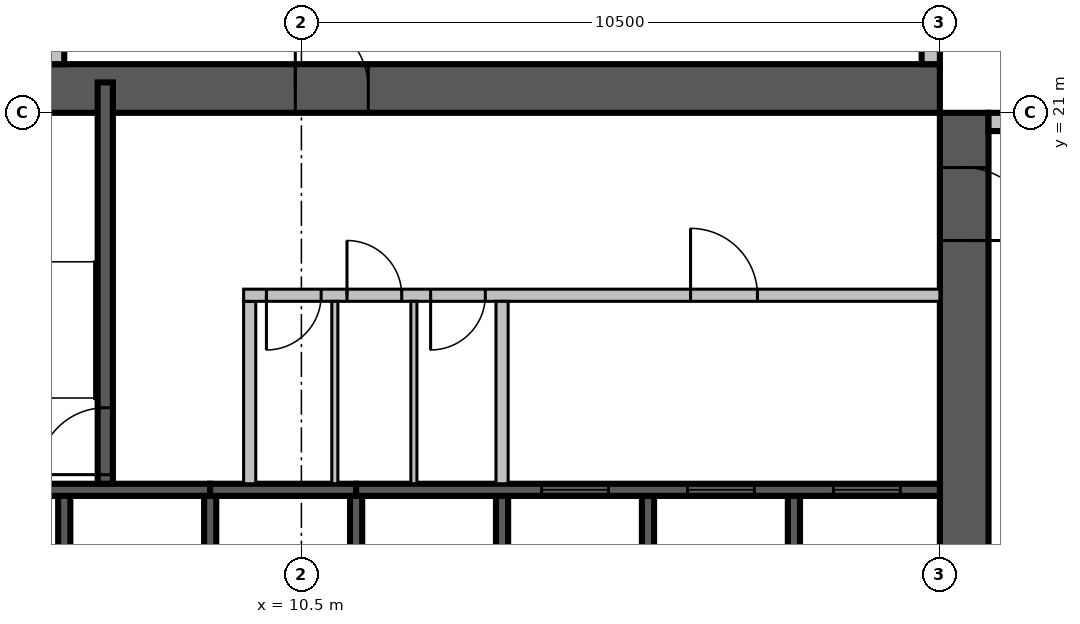
"""IFC4 building model, lengths in metres.
Left out: names, types, materials, properties, quantities, classifications, styles, units other than length and angle.
Written with IfcOpenShell. Run it as: python <this file> out.ifc"""

import sys

from ifc_helpers import new_model, si_unit, direction, frame, frame_2d, origin, place, context, subcontext, project, spatial, rectangle, extrude, source, transform, mapped, element, fill, save


model = new_model("IFC4")
c1 = context("Model", 3, precision=1e-05, world=origin(), true_north=direction((0.0, 1.0)))
c2 = subcontext(c1, "Body", "Model", "MODEL_VIEW")
j1 = project(units=[si_unit("LENGTHUNIT", "METRE"), si_unit("PLANEANGLEUNIT", "RADIAN")], contexts=[c1])
p1 = place(None, origin())
s1 = spatial("IfcSite", under=j1, at=p1, CompositionType="ELEMENT")
p2 = place(p1, origin())
s2 = spatial("IfcBuilding", under=s1, at=p2, CompositionType="ELEMENT")
p3 = place(p2, frame((0.0, 0.0, 219.6)))
s3 = spatial("IfcBuildingStorey", under=s2, at=p3, CompositionType="ELEMENT", Elevation=219.6)
m1 = source(origin(), c2, "Body", "SweptSolid", [
    extrude(rectangle(XDim=16.8, YDim=0.8, at=frame_2d((8.4, 0.0))), origin(), (0.0, 0.0, 1.0), 3.8),
])
p4 = place(p3, frame((21.4, 4.2, 0.0), z_axis=(0.0, 0.0, 1.0), x_axis=(0.0, 1.0, 0.0)))
e1 = element("IfcWall", 1, at=p4, inside=s3, PredefinedType="SHEAR", context=c2, shape_type="MappedRepresentation", body=[
    mapped(m1, transform((0.0, 0.0, 0.0), scale=1.0)),
])
m2 = source(origin(), c2, "Body", "SweptSolid", [
    extrude(rectangle(XDim=2.2, YDim=2.1, at=frame_2d((1.1, 1.05))), frame((0.0, 0.41, 0.0), z_axis=(0.0, -1.0, 0.0), x_axis=(1.0, 0.0, 0.0)), (0.0, 0.0, 1.0), 0.82),
])
p5 = place(p4, frame((4.2, 0.0, 0.0)))
e2 = element("IfcOpeningElement", 2, at=p5, cuts=e1, PredefinedType="OPENING", context=c2, shape_type="MappedRepresentation", body=[
    mapped(m2, transform((0.0, 0.0, 0.0), scale=1.0)),
])
m3 = source(origin(), c2, "Body", "SweptSolid", [
    extrude(rectangle(XDim=1.2, YDim=2.1, at=frame_2d((0.6, 1.05))), frame((0.0, 0.41, 0.0), z_axis=(0.0, -1.0, 0.0), x_axis=(1.0, 0.0, 0.0)), (0.0, 0.0, 1.0), 0.82),
])
p6 = place(p4, frame((14.7, 0.0, 0.0)))
e3 = element("IfcOpeningElement", 3, at=p6, cuts=e1, PredefinedType="OPENING", context=c2, shape_type="MappedRepresentation", body=[
    mapped(m3, transform((0.0, 0.0, 0.0), scale=1.0)),
])
p7 = place(p3, frame((4.2, 21.4, 0.0), z_axis=(0.0, 0.0, 1.0), x_axis=(1.0, 0.0, 0.0)))
e4 = element("IfcWall", 4, at=p7, inside=s3, PredefinedType="SHEAR", context=c2, shape_type="MappedRepresentation", body=[
    mapped(m1, transform((0.0, 0.0, 0.0), scale=1.0)),
])
p8 = place(p7, frame((6.2, 0.0, 0.0)))
e5 = element("IfcOpeningElement", 5, at=p8, cuts=e4, PredefinedType="OPENING", context=c2, shape_type="MappedRepresentation", body=[
    mapped(m3, transform((0.0, 0.0, 0.0), scale=1.0)),
])
m4 = source(origin(), c2, "Body", "SweptSolid", [
    extrude(rectangle(XDim=7.15, YDim=0.3, at=frame_2d((3.575, 0.0))), origin(), (0.0, 0.0, 1.0), 3.4),
])
p9 = place(p3, frame((28.95, 20.85, 0.0), z_axis=(0.0, 0.0, 1.0), x_axis=(-1.0, 0.0, 0.0)))
e6 = element("IfcWall", 6, at=p9, inside=s3, PredefinedType="STANDARD", context=c2, shape_type="MappedRepresentation", body=[
    mapped(m4, transform((0.0, 0.0, 0.0), scale=1.0)),
])
m5 = source(origin(), c2, "Body", "SweptSolid", [
    extrude(rectangle(XDim=3.0, YDim=2.3, at=frame_2d((1.5, 1.15))), frame((0.0, 0.16, 0.0), z_axis=(0.0, -1.0, 0.0), x_axis=(1.0, 0.0, 0.0)), (0.0, 0.0, 1.0), 0.32),
])
p10 = place(p9, frame((0.15, 0.0, 0.6)))
e7 = element("IfcOpeningElement", 7, at=p10, cuts=e6, PredefinedType="OPENING", context=c2, shape_type="MappedRepresentation", body=[
    mapped(m5, transform((0.0, 0.0, 0.0), scale=1.0)),
])
m6 = source(origin(), c2, "Body", "SweptSolid", [
    extrude(rectangle(XDim=1.8, YDim=2.3, at=frame_2d((0.9, 1.15))), frame((0.0, 0.16, 0.0), z_axis=(0.0, -1.0, 0.0), x_axis=(1.0, 0.0, 0.0)), (0.0, 0.0, 1.0), 0.32),
])
p11 = place(p9, frame((4.95, 0.0, 0.6)))
e8 = element("IfcOpeningElement", 8, at=p11, cuts=e6, PredefinedType="OPENING", context=c2, shape_type="MappedRepresentation", body=[
    mapped(m6, transform((0.0, 0.0, 0.0), scale=1.0)),
])
p12 = place(p3, frame((20.85, 21.8, 0.0), z_axis=(0.0, 0.0, 1.0), x_axis=(0.0, 1.0, 0.0)))
e9 = element("IfcWall", 9, at=p12, inside=s3, PredefinedType="STANDARD", context=c2, shape_type="MappedRepresentation", body=[
    mapped(m4, transform((0.0, 0.0, 0.0), scale=1.0)),
])
p13 = place(p12, frame((0.4, 0.0, 0.6)))
e10 = element("IfcOpeningElement", 10, at=p13, cuts=e9, PredefinedType="OPENING", context=c2, shape_type="MappedRepresentation", body=[
    mapped(m6, transform((0.0, 0.0, 0.0), scale=1.0)),
])
p14 = place(p12, frame((4.0, 0.0, 0.6)))
e11 = element("IfcOpeningElement", 11, at=p14, cuts=e9, PredefinedType="OPENING", context=c2, shape_type="MappedRepresentation", body=[
    mapped(m5, transform((0.0, 0.0, 0.0), scale=1.0)),
])
m7 = source(origin(), c2, "Body", "SweptSolid", [
    extrude(rectangle(XDim=16.6, YDim=0.3, at=frame_2d((8.3, 0.0))), origin(), (0.0, 0.0, 1.0), 3.4),
])
p15 = place(p3, frame((6.45, 38.4, 0.0), z_axis=(0.0, 0.0, 1.0), x_axis=(0.0, -1.0, 0.0)))
e12 = element("IfcWall", 12, at=p15, inside=s3, PredefinedType="STANDARD", context=c2, shape_type="MappedRepresentation", body=[
    mapped(m7, transform((0.0, 0.0, 0.0), scale=1.0)),
])
p16 = place(p15, frame((1.15, 0.0, 0.6)))
e13 = element("IfcOpeningElement", 13, at=p16, cuts=e12, PredefinedType="OPENING", context=c2, shape_type="MappedRepresentation", body=[
    mapped(m6, transform((0.0, 0.0, 0.0), scale=1.0)),
])
p17 = place(p15, frame((9.438, 0.0, 0.6)))
e14 = element("IfcOpeningElement", 14, at=p17, cuts=e12, PredefinedType="OPENING", context=c2, shape_type="MappedRepresentation", body=[
    mapped(m6, transform((0.0, 0.0, 0.0), scale=1.0)),
])
m8 = source(origin(), c2, "Body", "SweptSolid", [
    extrude(rectangle(XDim=1.2, YDim=2.3, at=frame_2d((0.6, 1.15))), frame((0.0, 0.16, 0.0), z_axis=(0.0, -1.0, 0.0), x_axis=(1.0, 0.0, 0.0)), (0.0, 0.0, 1.0), 0.32),
])
p18 = place(p15, frame((14.338, 0.0, 0.6)))
e15 = element("IfcOpeningElement", 15, at=p18, cuts=e12, PredefinedType="OPENING", context=c2, shape_type="MappedRepresentation", body=[
    mapped(m8, transform((0.0, 0.0, 0.0), scale=1.0)),
])
p19 = place(p15, frame((11.887, 0.0, 0.6)))
e16 = element("IfcOpeningElement", 16, at=p19, cuts=e12, PredefinedType="OPENING", context=c2, shape_type="MappedRepresentation", body=[
    mapped(m6, transform((0.0, 0.0, 0.0), scale=1.0)),
])
m9 = source(origin(), c2, "Body", "SweptSolid", [
    extrude(rectangle(XDim=1.0, YDim=2.1, at=frame_2d((0.5, 1.05))), frame((0.0, 0.16, 0.0), z_axis=(0.0, -1.0, 0.0), x_axis=(1.0, 0.0, 0.0)), (0.0, 0.0, 1.0), 0.32),
])
p20 = place(p15, frame((5.908, 0.0, 0.0)))
e17 = element("IfcOpeningElement", 17, at=p20, cuts=e12, PredefinedType="OPENING", context=c2, shape_type="MappedRepresentation", body=[
    mapped(m9, transform((0.0, 0.0, 0.0), scale=1.0)),
])
m10 = source(origin(), c2, "Body", "SweptSolid", [
    extrude(rectangle(XDim=3.0, YDim=0.2, at=frame_2d((1.5, 0.0))), origin(), (0.0, 0.0, 1.0), 3.8),
])
p21 = place(p3, frame((6.6, 11.7, 0.0), z_axis=(0.0, 0.0, 1.0), x_axis=(0.0, 1.0, 0.0)))
e18 = element("IfcWall", 18, at=p21, inside=s3, PredefinedType="SOLIDWALL", context=c2, shape_type="MappedRepresentation", body=[
    mapped(m10, transform((0.0, 0.0, 0.0), scale=1.0)),
])
m11 = source(origin(), c2, "Body", "SweptSolid", [
    extrude(rectangle(XDim=3.0, YDim=0.2, at=frame_2d((1.5, 0.0))), origin(), (0.0, 0.0, 1.0), 3.4),
])
for number, where, z_axis, x_axis in (
    (19, (9.0, 11.7, 0.0), (0.0, 0.0, 1.0), (0.0, 1.0, 0.0)),
    (20, (11.4, 11.7, 0.0), (0.0, 0.0, 1.0), (0.0, 1.0, 0.0)),
):
    element("IfcWall", number, at=place(p3, frame(where, z_axis=z_axis, x_axis=x_axis)), inside=s3, PredefinedType="SOLIDWALL", context=c2, shape_type="MappedRepresentation", body=[
        mapped(m11, transform((0.0, 0.0, 0.0), scale=1.0)),
    ])
for number, where, z_axis, x_axis in (
    (21, (13.8, 11.7, 0.0), (0.0, 0.0, 1.0), (0.0, 1.0, 0.0)),
    (22, (16.2, 11.7, 0.0), (0.0, 0.0, 1.0), (0.0, 1.0, 0.0)),
    (23, (18.6, 11.7, 0.0), (0.0, 0.0, 1.0), (0.0, 1.0, 0.0)),
):
    element("IfcWall", number, at=place(p3, frame(where, z_axis=z_axis, x_axis=x_axis)), inside=s3, PredefinedType="SOLIDWALL", context=c2, shape_type="MappedRepresentation", body=[
        mapped(m10, transform((0.0, 0.0, 0.0), scale=1.0)),
    ])
m12 = source(origin(), c2, "Body", "SweptSolid", [
    extrude(rectangle(XDim=4.8, YDim=0.2, at=frame_2d((2.4, 0.0))), origin(), (0.0, 0.0, 1.0), 3.8),
])
p22 = place(p3, frame((4.2, 14.8, 0.0), z_axis=(0.0, 0.0, 1.0), x_axis=(1.0, 0.0, 0.0)))
e24 = element("IfcWall", 24, at=p22, inside=s3, PredefinedType="SOLIDWALL", context=c2, shape_type="MappedRepresentation", body=[
    mapped(m12, transform((0.0, 0.0, 0.0), scale=1.0)),
])
m13 = source(origin(), c2, "Body", "SweptSolid", [
    extrude(rectangle(XDim=2.4, YDim=0.2, at=frame_2d((1.2, 0.0))), origin(), (0.0, 0.0, 1.0), 3.4),
])
p23 = place(p3, frame((9.0, 14.8, 0.0), z_axis=(0.0, 0.0, 1.0), x_axis=(1.0, 0.0, 0.0)))
e25 = element("IfcWall", 25, at=p23, inside=s3, PredefinedType="SOLIDWALL", context=c2, shape_type="MappedRepresentation", body=[
    mapped(m13, transform((0.0, 0.0, 0.0), scale=1.0)),
])
m14 = source(origin(), c2, "Body", "SweptSolid", [
    extrude(rectangle(XDim=9.6, YDim=0.2, at=frame_2d((4.8, 0.0))), origin(), (0.0, 0.0, 1.0), 3.8),
])
p24 = place(p3, frame((11.4, 14.8, 0.0), z_axis=(0.0, 0.0, 1.0), x_axis=(1.0, 0.0, 0.0)))
e26 = element("IfcWall", 26, at=p24, inside=s3, PredefinedType="SOLIDWALL", context=c2, shape_type="MappedRepresentation", body=[
    mapped(m14, transform((0.0, 0.0, 0.0), scale=1.0)),
])
m15 = source(origin(), c2, "Body", "SweptSolid", [
    extrude(rectangle(XDim=1.1, YDim=2.1, at=frame_2d((0.55, 1.05))), frame((0.0, 0.11, 0.0), z_axis=(0.0, -1.0, 0.0), x_axis=(1.0, 0.0, 0.0)), (0.0, 0.0, 1.0), 0.22),
])
p25 = place(p24, frame((3.05, 0.0, 0.0)))
e27 = element("IfcOpeningElement", 27, at=p25, cuts=e26, PredefinedType="OPENING", context=c2, shape_type="MappedRepresentation", body=[
    mapped(m15, transform((0.0, 0.0, 0.0), scale=1.0)),
])
p26 = place(p24, frame((5.45, 0.0, 0.0)))
e28 = element("IfcOpeningElement", 28, at=p26, cuts=e26, PredefinedType="OPENING", context=c2, shape_type="MappedRepresentation", body=[
    mapped(m15, transform((0.0, 0.0, 0.0), scale=1.0)),
])
p27 = place(p24, frame((7.85, 0.0, 0.0)))
e29 = element("IfcOpeningElement", 29, at=p27, cuts=e26, PredefinedType="OPENING", context=c2, shape_type="MappedRepresentation", body=[
    mapped(m15, transform((0.0, 0.0, 0.0), scale=1.0)),
])
m16 = source(origin(), c2, "Body", "SweptSolid", [
    extrude(rectangle(XDim=6.6, YDim=0.25, at=frame_2d((3.3, 0.0))), origin(), (0.0, 0.0, 1.0), 3.4),
])
p28 = place(p3, frame((7.275, 14.9, 0.0), z_axis=(0.0, 0.0, 1.0), x_axis=(0.0, 1.0, 0.0)))
e30 = element("IfcWall", 30, at=p28, inside=s3, PredefinedType="SOLIDWALL", context=c2, shape_type="MappedRepresentation", body=[
    mapped(m16, transform((0.0, 0.0, 0.0), scale=1.0)),
])
m17 = source(origin(), c2, "Body", "SweptSolid", [
    extrude(rectangle(XDim=1.1, YDim=2.1, at=frame_2d((0.55, 1.05))), frame((0.0, 0.135, 0.0), z_axis=(0.0, -1.0, 0.0), x_axis=(1.0, 0.0, 0.0)), (0.0, 0.0, 1.0), 0.27),
])
p29 = place(p28, frame((0.15, 0.0, 0.0)))
e31 = element("IfcOpeningElement", 31, at=p29, cuts=e30, PredefinedType="OPENING", context=c2, shape_type="MappedRepresentation", body=[
    mapped(m17, transform((0.0, 0.0, 0.0), scale=1.0)),
])
m18 = source(origin(), c2, "Body", "SweptSolid", [
    extrude(rectangle(XDim=3.0, YDim=0.2, at=frame_2d((1.5, 0.0))), origin(), (0.0, 0.0, 1.0), 3.4),
])
p30 = place(p3, frame((9.65, 14.9, 0.0), z_axis=(0.0, 0.0, 1.0), x_axis=(0.0, 1.0, 0.0)))
e32 = element("IfcWall", 32, at=p30, inside=s3, PredefinedType="PARTITIONING", context=c2, shape_type="MappedRepresentation", body=[
    mapped(m18, transform((0.0, 0.0, 0.0), scale=1.0)),
])
m19 = source(origin(), c2, "Body", "SweptSolid", [
    extrude(rectangle(XDim=11.45, YDim=0.2, at=frame_2d((5.725, 0.0))), origin(), (0.0, 0.0, 1.0), 3.4),
])
p31 = place(p3, frame((9.55, 18.0, 0.0), z_axis=(0.0, 0.0, 1.0), x_axis=(1.0, 0.0, 0.0)))
e33 = element("IfcWall", 33, at=p31, inside=s3, PredefinedType="PARTITIONING", context=c2, shape_type="MappedRepresentation", body=[
    mapped(m19, transform((0.0, 0.0, 0.0), scale=1.0)),
])
m20 = source(origin(), c2, "Body", "SweptSolid", [
    extrude(rectangle(XDim=0.9, YDim=2.1, at=frame_2d((0.45, 1.05))), frame((0.0, 0.11, 0.0), z_axis=(0.0, -1.0, 0.0), x_axis=(1.0, 0.0, 0.0)), (0.0, 0.0, 1.0), 0.22),
])
p32 = place(p31, frame((0.375, 0.0, 0.0)))
e34 = element("IfcOpeningElement", 34, at=p32, cuts=e33, PredefinedType="OPENING", context=c2, shape_type="MappedRepresentation", body=[
    mapped(m20, transform((0.0, 0.0, 0.0), scale=1.0)),
])
p33 = place(p31, frame((1.7, 0.0, 0.0)))
e35 = element("IfcOpeningElement", 35, at=p33, cuts=e33, PredefinedType="OPENING", context=c2, shape_type="MappedRepresentation", body=[
    mapped(m20, transform((0.0, 0.0, 0.0), scale=1.0)),
])
p34 = place(p31, frame((3.075, 0.0, 0.0)))
e36 = element("IfcOpeningElement", 36, at=p34, cuts=e33, PredefinedType="OPENING", context=c2, shape_type="MappedRepresentation", body=[
    mapped(m20, transform((0.0, 0.0, 0.0), scale=1.0)),
])
p35 = place(p31, frame((7.35, 0.0, 0.0)))
e37 = element("IfcOpeningElement", 37, at=p35, cuts=e33, PredefinedType="OPENING", context=c2, shape_type="MappedRepresentation", body=[
    mapped(m15, transform((0.0, 0.0, 0.0), scale=1.0)),
])
p36 = place(p3, frame((13.8, 14.9, 0.0), z_axis=(0.0, 0.0, 1.0), x_axis=(0.0, 1.0, 0.0)))
e38 = element("IfcWall", 38, at=p36, inside=s3, PredefinedType="PARTITIONING", context=c2, shape_type="MappedRepresentation", body=[
    mapped(m18, transform((0.0, 0.0, 0.0), scale=1.0)),
])
m21 = source(origin(), c2, "Body", "SweptSolid", [
    extrude(rectangle(XDim=3.0, YDim=0.1, at=frame_2d((1.5, 0.0))), origin(), (0.0, 0.0, 1.0), 3.4),
])
for number, where, z_axis, x_axis in (
    (39, (11.05, 14.9, 0.0), (0.0, 0.0, 1.0), (0.0, 1.0, 0.0)),
    (40, (12.35, 14.9, 0.0), (0.0, 0.0, 1.0), (0.0, 1.0, 0.0)),
):
    element("IfcWall", number, at=place(p3, frame(where, z_axis=z_axis, x_axis=x_axis)), inside=s3, PredefinedType="PARTITIONING", context=c2, shape_type="MappedRepresentation", body=[
        mapped(m21, transform((0.0, 0.0, 0.0), scale=1.0)),
    ])
m22 = source(origin(), c2, "Body", "SweptSolid", [
    extrude(rectangle(XDim=1.1, YDim=2.1, at=frame_2d((0.55, 1.05))), frame((0.0, 0.025, 0.0), z_axis=(0.0, -1.0, 0.0), x_axis=(1.0, 0.0, 0.0)), (0.0, 0.0, 1.0), 0.05),
])
p37 = place(p25, origin())
e41 = element("IfcDoor", 41, at=p37, inside=s3, OperationType="SLIDING_TO_LEFT", PredefinedType="DOOR", context=c2, shape_type="MappedRepresentation", body=[
    mapped(m22, transform((0.0, 0.0, 0.0), scale=1.0)),
])
fill(e27, e41)
p38 = place(p26, origin())
e42 = element("IfcDoor", 42, at=p38, inside=s3, OperationType="SLIDING_TO_LEFT", PredefinedType="DOOR", context=c2, shape_type="MappedRepresentation", body=[
    mapped(m22, transform((0.0, 0.0, 0.0), scale=1.0)),
])
fill(e28, e42)
p39 = place(p27, origin())
e43 = element("IfcDoor", 43, at=p39, inside=s3, OperationType="SLIDING_TO_LEFT", PredefinedType="DOOR", context=c2, shape_type="MappedRepresentation", body=[
    mapped(m22, transform((0.0, 0.0, 0.0), scale=1.0)),
])
fill(e29, e43)
p40 = place(p29, origin())
e44 = element("IfcDoor", 44, at=p40, inside=s3, OperationType="SINGLE_SWING_LEFT", PredefinedType="DOOR", context=c2, shape_type="MappedRepresentation", body=[
    mapped(m22, transform((0.0, 0.0, 0.0), scale=1.0)),
])
fill(e31, e44)
m23 = source(origin(), c2, "Body", "SweptSolid", [
    extrude(rectangle(XDim=0.9, YDim=2.1, at=frame_2d((0.45, 1.05))), frame((0.0, 0.025, 0.0), z_axis=(0.0, -1.0, 0.0), x_axis=(1.0, 0.0, 0.0)), (0.0, 0.0, 1.0), 0.05),
])
p41 = place(p32, origin())
e45 = element("IfcDoor", 45, at=p41, inside=s3, OperationType="SINGLE_SWING_RIGHT", PredefinedType="DOOR", context=c2, shape_type="MappedRepresentation", body=[
    mapped(m23, transform((0.0, 0.0, 0.0), scale=1.0)),
])
fill(e34, e45)
p42 = place(p33, origin())
e46 = element("IfcDoor", 46, at=p42, inside=s3, OperationType="SINGLE_SWING_LEFT", PredefinedType="DOOR", context=c2, shape_type="MappedRepresentation", body=[
    mapped(m23, transform((0.0, 0.0, 0.0), scale=1.0)),
])
fill(e35, e46)
p43 = place(p34, origin())
e47 = element("IfcDoor", 47, at=p43, inside=s3, OperationType="SINGLE_SWING_RIGHT", PredefinedType="DOOR", context=c2, shape_type="MappedRepresentation", body=[
    mapped(m23, transform((0.0, 0.0, 0.0), scale=1.0)),
])
fill(e36, e47)
p44 = place(p35, origin())
e48 = element("IfcDoor", 48, at=p44, inside=s3, OperationType="SINGLE_SWING_LEFT", PredefinedType="DOOR", context=c2, shape_type="MappedRepresentation", body=[
    mapped(m22, transform((0.0, 0.0, 0.0), scale=1.0)),
])
fill(e37, e48)
m24 = source(origin(), c2, "Body", "SweptSolid", [
    extrude(rectangle(XDim=1.2, YDim=2.1, at=frame_2d((0.6, 1.05))), frame((0.0, 0.025, 0.0), z_axis=(0.0, -1.0, 0.0), x_axis=(1.0, 0.0, 0.0)), (0.0, 0.0, 1.0), 0.05),
])
p45 = place(p8, origin())
e49 = element("IfcDoor", 49, at=p45, inside=s3, OperationType="SINGLE_SWING_LEFT", PredefinedType="DOOR", context=c2, shape_type="MappedRepresentation", body=[
    mapped(m24, transform((0.0, 0.0, 0.0), scale=1.0)),
])
fill(e5, e49)
p46 = place(p6, origin())
e50 = element("IfcDoor", 50, at=p46, inside=s3, OperationType="SINGLE_SWING_RIGHT", PredefinedType="DOOR", context=c2, shape_type="MappedRepresentation", body=[
    mapped(m24, transform((0.0, 0.0, 0.0), scale=1.0)),
])
fill(e3, e50)
save(model, sys.argv[1])
